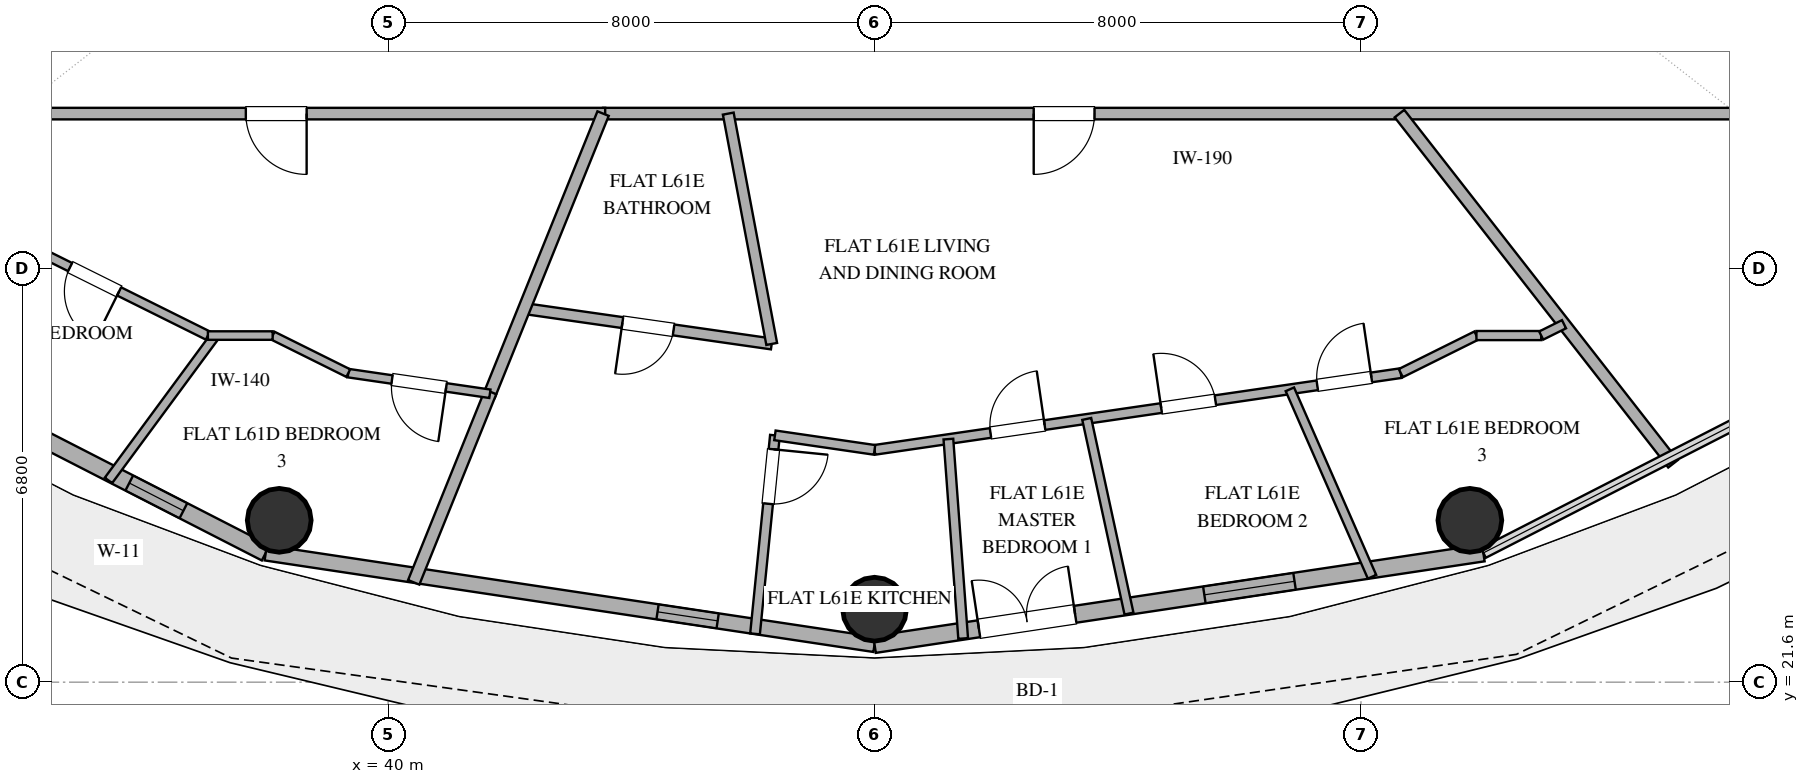
"""IFC4 building model, lengths in metres.
Left out: names, types, materials, properties, quantities, classifications, styles, units other than length and angle.
Written with IfcOpenShell. Run it as: python <this file> out.ifc"""

import sys

from ifc_helpers import new_model, si_unit, direction, frame, frame_2d, origin, origin_2d, place, context, subcontext, project, spatial, rectangle, hollow_circle, extrude, element, fill, save


model = new_model("IFC4")
c1 = context("Model", 3, precision=1e-05, world=origin(), true_north=direction((0.0, 1.0)))
c2 = subcontext(c1, "Body", "Model", "MODEL_VIEW")
j1 = project(units=[si_unit("LENGTHUNIT", "METRE"), si_unit("PLANEANGLEUNIT", "RADIAN")], contexts=[c1])
p1 = place(None, origin())
s1 = spatial("IfcSite", under=j1, at=p1, CompositionType="ELEMENT")
p2 = place(p1, origin())
s2 = spatial("IfcBuilding", under=s1, at=p2, CompositionType="ELEMENT")
p3 = place(p2, frame((0.0, 0.0, 238.8)))
s3 = spatial("IfcBuildingStorey", under=s2, at=p3, CompositionType="ELEMENT", Elevation=238.8)
for number, where, z_axis, x_axis in (
    (1, (38.209, 24.261, 0.0), (0.0, 0.0, 1.0), (1.0, 0.0, 0.0)),
    (2, (48.0, 22.8, 0.0), (0.0, 0.0, 1.0), (1.0, 0.0, 0.0)),
    (3, (57.791, 24.261, 0.0), (0.0, 0.0, 1.0), (1.0, 0.0, 0.0)),
):
    element("IfcColumn", number, at=place(p3, frame(where, z_axis=z_axis, x_axis=x_axis)), inside=s3, PredefinedType="COLUMN", context=c2, shape_type="SweptSolid", body=[
        extrude(hollow_circle(Radius=0.525, WallThickness=0.028, at=origin_2d()), origin(), (0.0, 0.0, 1.0), 3.36),
    ])
p4 = place(p3, frame((29.617, 28.013, 0.0), z_axis=(0.0, 0.0, 1.0), x_axis=(0.890007394051, -0.455946091699, 0.0)))
e4 = element("IfcWall", 4, at=p4, inside=s3, PredefinedType="SOLIDWALL", context=c2, shape_type="SweptSolid", body=[
    extrude(rectangle(XDim=9.404, YDim=0.28, at=frame_2d((4.702, 0.0))), origin(), (0.0, 0.0, 1.0), 3.36),
])
p5 = place(p4, frame((3.073, 0.0, 0.85)))
e5 = element("IfcOpeningElement", 5, at=p5, cuts=e4, PredefinedType="OPENING", context=c2, shape_type="SweptSolid", body=[
    extrude(rectangle(XDim=2.1, YDim=2.2, at=frame_2d((1.05, 1.1))), frame((0.0, 0.15, 0.0), z_axis=(0.0, -1.0, 0.0), x_axis=(1.0, 0.0, 0.0)), (0.0, 0.0, 1.0), 0.3),
])
p6 = place(p4, frame((6.883, 0.0, 0.85)))
e6 = element("IfcOpeningElement", 6, at=p6, cuts=e4, PredefinedType="OPENING", context=c2, shape_type="SweptSolid", body=[
    extrude(rectangle(XDim=1.0, YDim=1.8, at=frame_2d((0.5, 0.9))), frame((0.0, 0.15, 0.0), z_axis=(0.0, -1.0, 0.0), x_axis=(1.0, 0.0, 0.0)), (0.0, 0.0, 1.0), 0.3),
])
p7 = place(p3, frame((37.987, 23.726, 0.0), z_axis=(0.0, 0.0, 1.0), x_axis=(0.988882522213, -0.148698881169, 0.0)))
e7 = element("IfcWall", 7, at=p7, inside=s3, PredefinedType="SOLIDWALL", context=c2, shape_type="SweptSolid", body=[
    extrude(rectangle(XDim=10.125, YDim=0.25, at=frame_2d((5.062, 0.0))), origin(), (0.0, 0.0, 1.0), 3.36),
])
p8 = place(p7, frame((6.516, 0.0, 1.42)))
e8 = element("IfcOpeningElement", 8, at=p8, cuts=e7, PredefinedType="OPENING", context=c2, shape_type="SweptSolid", body=[
    extrude(rectangle(XDim=1.0, YDim=1.05, at=frame_2d((0.5, 0.525))), frame((0.0, 0.135, 0.0), z_axis=(0.0, -1.0, 0.0), x_axis=(1.0, 0.0, 0.0)), (0.0, 0.0, 1.0), 0.27),
])
p9 = place(p3, frame((48.0, 22.22, 0.0), z_axis=(0.0, 0.0, 1.0), x_axis=(0.988882522213, 0.148698881169, 0.0)))
e9 = element("IfcWall", 9, at=p9, inside=s3, PredefinedType="SOLIDWALL", context=c2, shape_type="SweptSolid", body=[
    extrude(rectangle(XDim=10.125, YDim=0.28, at=frame_2d((5.062, 0.0))), origin(), (0.0, 0.0, 1.0), 3.36),
])
p10 = place(p9, frame((1.736, 0.0, 0.0)))
e10 = element("IfcOpeningElement", 10, at=p10, cuts=e9, PredefinedType="OPENING", context=c2, shape_type="SweptSolid", body=[
    extrude(rectangle(XDim=1.6, YDim=2.25, at=frame_2d((0.8, 1.125))), frame((0.0, 0.15, 0.0), z_axis=(0.0, -1.0, 0.0), x_axis=(1.0, 0.0, 0.0)), (0.0, 0.0, 1.0), 0.3),
])
p11 = place(p9, frame((5.485, 0.0, 0.85)))
e11 = element("IfcOpeningElement", 11, at=p11, cuts=e9, PredefinedType="OPENING", context=c2, shape_type="SweptSolid", body=[
    extrude(rectangle(XDim=1.5, YDim=2.0, at=frame_2d((0.75, 1.0))), frame((0.0, 0.15, 0.0), z_axis=(0.0, -1.0, 0.0), x_axis=(1.0, 0.0, 0.0)), (0.0, 0.0, 1.0), 0.3),
])
p12 = place(p3, frame((63.25, 30.95, 0.0), z_axis=(0.0, 0.0, 1.0), x_axis=(-1.0, 0.0, 0.0)))
e12 = element("IfcWall", 12, at=p12, inside=s3, PredefinedType="PARTITIONING", context=c2, shape_type="SweptSolid", body=[
    extrude(rectangle(XDim=19.715, YDim=0.19, at=frame_2d((9.857, 0.0))), origin(), (0.0, 0.0, 1.0), 2.72),
])
p13 = place(p12, frame((11.632, 0.0, 0.0)))
e13 = element("IfcOpeningElement", 13, at=p13, cuts=e12, PredefinedType="OPENING", context=c2, shape_type="SweptSolid", body=[
    extrude(rectangle(XDim=1.0, YDim=2.2, at=frame_2d((0.5, 1.1))), frame((0.0, 0.105, 0.0), z_axis=(0.0, -1.0, 0.0), x_axis=(1.0, 0.0, 0.0)), (0.0, 0.0, 1.0), 0.21),
])
p14 = place(p3, frame((43.57, 30.95, 0.0), z_axis=(0.0, 0.0, 1.0), x_axis=(-1.0, 0.0, 0.0)))
e14 = element("IfcWall", 14, at=p14, inside=s3, PredefinedType="PARTITIONING", context=c2, shape_type="SweptSolid", body=[
    extrude(rectangle(XDim=10.82, YDim=0.19, at=frame_2d((5.41, 0.0))), origin(), (0.0, 0.0, 1.0), 2.72),
])
p15 = place(p14, frame((4.91, 0.0, 0.0)))
e15 = element("IfcOpeningElement", 15, at=p15, cuts=e14, PredefinedType="OPENING", context=c2, shape_type="SweptSolid", body=[
    extrude(rectangle(XDim=1.0, YDim=2.2, at=frame_2d((0.5, 1.1))), frame((0.0, 0.105, 0.0), z_axis=(0.0, -1.0, 0.0), x_axis=(1.0, 0.0, 0.0)), (0.0, 0.0, 1.0), 0.21),
])
p16 = place(p3, frame((56.633, 30.95, 0.0), z_axis=(0.0, 0.0, 1.0), x_axis=(0.615657656631, -0.788013737083, 0.0)))
e16 = element("IfcWall", 16, at=p16, inside=s3, PredefinedType="PARTITIONING", context=c2, shape_type="SweptSolid", body=[
    extrude(rectangle(XDim=7.308, YDim=0.2, at=frame_2d((3.654, 0.0))), origin(), (0.0, 0.0, 1.0), 2.72),
])
p17 = place(p3, frame((37.036, 27.3, 0.0), z_axis=(0.0, 0.0, 1.0), x_axis=(-0.895471406875, 0.445119039661, 0.0)))
e17 = element("IfcWall", 17, at=p17, inside=s3, PredefinedType="PARTITIONING", context=c2, shape_type="SweptSolid", body=[
    extrude(rectangle(XDim=5.971, YDim=0.15, at=frame_2d((2.986, 0.0))), origin(), (0.0, 0.0, 1.0), 2.72),
])
p18 = place(p17, frame((1.631, 0.0, 0.0)))
e18 = element("IfcOpeningElement", 18, at=p18, cuts=e17, PredefinedType="OPENING", context=c2, shape_type="SweptSolid", body=[
    extrude(rectangle(XDim=0.9, YDim=2.1, at=frame_2d((0.45, 1.05))), frame((0.0, 0.085, 0.0), z_axis=(0.0, -1.0, 0.0), x_axis=(1.0, 0.0, 0.0)), (0.0, 0.0, 1.0), 0.17),
])
p19 = place(p17, frame((4.582, 0.0, 0.0)))
e19 = element("IfcOpeningElement", 19, at=p19, cuts=e17, PredefinedType="OPENING", context=c2, shape_type="SweptSolid", body=[
    extrude(rectangle(XDim=0.9, YDim=2.1, at=frame_2d((0.45, 1.05))), frame((0.0, 0.085, 0.0), z_axis=(0.0, -1.0, 0.0), x_axis=(1.0, 0.0, 0.0)), (0.0, 0.0, 1.0), 0.17),
])
p20 = place(p3, frame((46.309, 27.162, 0.0), z_axis=(0.0, 0.0, 1.0), x_axis=(-0.989929285776, 0.141562739319, 0.0)))
e20 = element("IfcWall", 20, at=p20, inside=s3, PredefinedType="PLUMBINGWALL", context=c2, shape_type="SweptSolid", body=[
    extrude(rectangle(XDim=4.11, YDim=0.18, at=frame_2d((2.055, 0.0))), origin(), (0.0, 0.0, 1.0), 2.72),
])
p21 = place(p20, frame((1.63, 0.0, 0.0)))
e21 = element("IfcOpeningElement", 21, at=p21, cuts=e20, PredefinedType="OPENING", context=c2, shape_type="SweptSolid", body=[
    extrude(rectangle(XDim=0.85, YDim=2.1, at=frame_2d((0.425, 1.05))), frame((0.0, 0.1, 0.0), z_axis=(0.0, -1.0, 0.0), x_axis=(1.0, 0.0, 0.0)), (0.0, 0.0, 1.0), 0.2),
])
p22 = place(p3, frame((45.594, 30.95, 0.0), z_axis=(0.0, 0.0, 1.0), x_axis=(0.18532477331, -0.982677326694, 0.0)))
e22 = element("IfcWall", 22, at=p22, inside=s3, PredefinedType="PLUMBINGWALL", context=c2, shape_type="SweptSolid", body=[
    extrude(rectangle(XDim=3.854, YDim=0.18, at=frame_2d((1.927, 0.0))), origin(), (0.0, 0.0, 1.0), 2.72),
])
p23 = place(p3, frame((43.535, 30.95, 0.0), z_axis=(0.0, 0.0, 1.0), x_axis=(-0.374594584492, -0.927188706397, 0.0)))
e23 = element("IfcWall", 23, at=p23, inside=s3, PredefinedType="PARTITIONING", context=c2, shape_type="SweptSolid", body=[
    extrude(rectangle(XDim=5.002, YDim=0.2, at=frame_2d((2.501, 0.0))), origin(), (0.0, 0.0, 1.0), 2.72),
])
p24 = place(p3, frame((40.421, 23.242, 0.0), z_axis=(0.0, 0.0, 1.0), x_axis=(0.374604084458, 0.927184868248, 0.0)))
e24 = element("IfcWall", 24, at=p24, inside=s3, PredefinedType="PARTITIONING", context=c2, shape_type="SweptSolid", body=[
    extrude(rectangle(XDim=3.377, YDim=0.2, at=frame_2d((1.688, 0.0))), origin(), (0.0, 0.0, 1.0), 2.72),
])
p25 = place(p3, frame((48.0, 25.42, 0.0), z_axis=(0.0, 0.0, 1.0), x_axis=(0.989540121389, 0.144257922351, 0.0)))
e25 = element("IfcWall", 25, at=p25, inside=s3, PredefinedType="PLUMBINGWALL", context=c2, shape_type="SweptSolid", body=[
    extrude(rectangle(XDim=8.746, YDim=0.16, at=frame_2d((4.373, 0.0))), origin(), (0.0, 0.0, 1.0), 2.72),
])
p26 = place(p25, frame((4.765, 0.0, 0.0)))
e26 = element("IfcOpeningElement", 26, at=p26, cuts=e25, PredefinedType="OPENING", context=c2, shape_type="SweptSolid", body=[
    extrude(rectangle(XDim=0.9, YDim=2.1, at=frame_2d((0.45, 1.05))), frame((0.0, 0.09, 0.0), z_axis=(0.0, -1.0, 0.0), x_axis=(1.0, 0.0, 0.0)), (0.0, 0.0, 1.0), 0.18),
])
p27 = place(p25, frame((1.927, 0.0, 0.0)))
e27 = element("IfcOpeningElement", 27, at=p27, cuts=e25, PredefinedType="OPENING", context=c2, shape_type="SweptSolid", body=[
    extrude(rectangle(XDim=0.9, YDim=2.1, at=frame_2d((0.45, 1.05))), frame((0.0, 0.09, 0.0), z_axis=(0.0, -1.0, 0.0), x_axis=(1.0, 0.0, 0.0)), (0.0, 0.0, 1.0), 0.18),
])
p28 = place(p25, frame((7.358, 0.0, 0.0)))
e28 = element("IfcOpeningElement", 28, at=p28, cuts=e25, PredefinedType="OPENING", context=c2, shape_type="SweptSolid", body=[
    extrude(rectangle(XDim=0.9, YDim=2.1, at=frame_2d((0.45, 1.05))), frame((0.0, 0.09, 0.0), z_axis=(0.0, -1.0, 0.0), x_axis=(1.0, 0.0, 0.0)), (0.0, 0.0, 1.0), 0.18),
])
p29 = place(p3, frame((54.831, 26.416, 0.0), z_axis=(0.0, 0.0, 1.0), x_axis=(0.401469388376, -0.915872442099, 0.0)))
e29 = element("IfcWall", 29, at=p29, inside=s3, PredefinedType="PARTITIONING", context=c2, shape_type="SweptSolid", body=[
    extrude(rectangle(XDim=3.366, YDim=0.15, at=frame_2d((1.683, 0.0))), origin(), (0.0, 0.0, 1.0), 2.72),
])
p30 = place(p3, frame((49.458, 22.318, 0.0), z_axis=(0.0, 0.0, 1.0), x_axis=(-0.073879890619, 0.997267146637, 0.0)))
e30 = element("IfcWall", 30, at=p30, inside=s3, PredefinedType="PLUMBINGWALL", context=c2, shape_type="SweptSolid", body=[
    extrude(rectangle(XDim=3.288, YDim=0.16, at=frame_2d((1.644, 0.0))), origin(), (0.0, 0.0, 1.0), 2.72),
])
p31 = place(p3, frame((46.362, 25.659, 0.0), z_axis=(0.0, 0.0, 1.0), x_axis=(-0.099783673114, -0.995009155023, 0.0)))
e31 = element("IfcWall", 31, at=p31, inside=s3, PredefinedType="PLUMBINGWALL", context=c2, shape_type="SweptSolid", body=[
    extrude(rectangle(XDim=3.281, YDim=0.16, at=frame_2d((1.641, 0.0))), origin(), (0.0, 0.0, 1.0), 2.72),
])
p32 = place(p31, frame((0.23, 0.0, 0.0)))
e32 = element("IfcOpeningElement", 32, at=p32, cuts=e31, PredefinedType="OPENING", context=c2, shape_type="SweptSolid", body=[
    extrude(rectangle(XDim=0.9, YDim=2.1, at=frame_2d((0.45, 1.05))), frame((0.0, 0.09, 0.0), z_axis=(0.0, -1.0, 0.0), x_axis=(1.0, 0.0, 0.0)), (0.0, 0.0, 1.0), 0.18),
])
p33 = place(p3, frame((52.185, 22.728, 0.0), z_axis=(0.0, 0.0, 1.0), x_axis=(-0.212200652442, 0.977226116671, 0.0)))
e33 = element("IfcWall", 33, at=p33, inside=s3, PredefinedType="PARTITIONING", context=c2, shape_type="SweptSolid", body=[
    extrude(rectangle(XDim=3.276, YDim=0.15, at=frame_2d((1.638, 0.0))), origin(), (0.0, 0.0, 1.0), 2.72),
])
p34 = place(p3, frame((35.401, 24.918, 0.0), z_axis=(0.0, 0.0, 1.0), x_axis=(0.593567519028, 0.804784194897, 0.0)))
e34 = element("IfcWall", 34, at=p34, inside=s3, PredefinedType="PARTITIONING", context=c2, shape_type="SweptSolid", body=[
    extrude(rectangle(XDim=2.96, YDim=0.15, at=frame_2d((1.48, 0.0))), origin(), (0.0, 0.0, 1.0), 2.72),
])
p35 = place(p3, frame((41.674, 26.343, 0.0), z_axis=(0.0, 0.0, 1.0), x_axis=(-0.989532363779, 0.144311125814, 0.0)))
e35 = element("IfcWall", 35, at=p35, inside=s3, PredefinedType="PARTITIONING", context=c2, shape_type="SweptSolid", body=[
    extrude(rectangle(XDim=2.353, YDim=0.14, at=frame_2d((1.177, 0.0))), origin(), (0.0, 0.0, 1.0), 2.72),
])
p36 = place(p35, frame((0.727, 0.0, 0.0)))
e36 = element("IfcOpeningElement", 36, at=p36, cuts=e35, PredefinedType="OPENING", context=c2, shape_type="SweptSolid", body=[
    extrude(rectangle(XDim=0.9, YDim=2.1, at=frame_2d((0.45, 1.05))), frame((0.0, 0.08, 0.0), z_axis=(0.0, -1.0, 0.0), x_axis=(1.0, 0.0, 0.0)), (0.0, 0.0, 1.0), 0.16),
])
p37 = place(p3, frame((48.0, 25.42, 0.0), z_axis=(0.0, 0.0, 1.0), x_axis=(-0.989523327183, 0.144373075605, 0.0)))
e37 = element("IfcWall", 37, at=p37, inside=s3, PredefinedType="PLUMBINGWALL", context=c2, shape_type="SweptSolid", body=[
    extrude(rectangle(XDim=1.656, YDim=0.16, at=frame_2d((0.828, 0.0))), origin(), (0.0, 0.0, 1.0), 2.72),
])
p38 = place(p3, frame((39.345, 26.682, 0.0), z_axis=(0.0, 0.0, 1.0), x_axis=(-0.895584310315, 0.444891833053, 0.0)))
e38 = element("IfcWall", 38, at=p38, inside=s3, PredefinedType="PARTITIONING", context=c2, shape_type="SweptSolid", body=[
    extrude(rectangle(XDim=1.389, YDim=0.14, at=frame_2d((0.694, 0.0))), origin(), (0.0, 0.0, 1.0), 2.72),
])
p39 = place(p3, frame((57.899, 27.3, 0.0), z_axis=(0.0, 0.0, 1.0), x_axis=(-0.895584310315, -0.444891833053, 0.0)))
e39 = element("IfcWall", 39, at=p39, inside=s3, PredefinedType="PARTITIONING", context=c2, shape_type="SweptSolid", body=[
    extrude(rectangle(XDim=1.389, YDim=0.15, at=frame_2d((0.694, 0.0))), origin(), (0.0, 0.0, 1.0), 2.72),
])
p40 = place(p3, frame((58.964, 27.3, 0.0), z_axis=(0.0, 0.0, 1.0), x_axis=(-1.0, 0.0, 0.0)))
e40 = element("IfcWall", 40, at=p40, inside=s3, PredefinedType="PARTITIONING", context=c2, shape_type="SweptSolid", body=[
    extrude(rectangle(XDim=1.065, YDim=0.15, at=frame_2d((0.533, 0.0))), origin(), (0.0, 0.0, 1.0), 2.72),
])
p41 = place(p3, frame((38.101, 27.3, 0.0), z_axis=(0.0, 0.0, 1.0), x_axis=(-1.0, 0.0, 0.0)))
e41 = element("IfcWall", 41, at=p41, inside=s3, PredefinedType="PARTITIONING", context=c2, shape_type="SweptSolid", body=[
    extrude(rectangle(XDim=1.065, YDim=0.14, at=frame_2d((0.533, 0.0))), origin(), (0.0, 0.0, 1.0), 2.72),
])
p42 = place(p3, frame((59.339, 27.487, 0.0), z_axis=(0.0, 0.0, 1.0), x_axis=(-0.895473432012, -0.445114965554, 0.0)))
e42 = element("IfcWall", 42, at=p42, inside=s3, PredefinedType="PARTITIONING", context=c2, shape_type="SweptSolid", body=[
    extrude(rectangle(XDim=0.419, YDim=0.15, at=frame_2d((0.209, 0.0))), origin(), (0.0, 0.0, 1.0), 2.72),
])
p43 = place(p6, origin())
e43 = element("IfcWindow", 43, at=p43, inside=s3, PartitioningType="SINGLE_PANEL", PredefinedType="WINDOW", context=c2, shape_type="SweptSolid", body=[
    extrude(rectangle(XDim=1.0, YDim=1.8, at=frame_2d((0.5, 0.9))), frame((0.0, 0.03, 0.0), z_axis=(0.0, -1.0, 0.0), x_axis=(1.0, 0.0, 0.0)), (0.0, 0.0, 1.0), 0.06),
])
fill(e6, e43)
p44 = place(p10, origin())
e44 = element("IfcDoor", 44, at=p44, inside=s3, OperationType="DOUBLE_DOOR_SINGLE_SWING", PredefinedType="DOOR", context=c2, shape_type="SweptSolid", body=[
    extrude(rectangle(XDim=1.6, YDim=2.25, at=frame_2d((0.8, 1.125))), frame((0.0, 0.025, 0.0), z_axis=(0.0, -1.0, 0.0), x_axis=(1.0, 0.0, 0.0)), (0.0, 0.0, 1.0), 0.05),
])
fill(e10, e44)
p45 = place(p11, origin())
e45 = element("IfcWindow", 45, at=p45, inside=s3, PartitioningType="SINGLE_PANEL", PredefinedType="WINDOW", context=c2, shape_type="SweptSolid", body=[
    extrude(rectangle(XDim=1.5, YDim=2.0, at=frame_2d((0.75, 1.0))), frame((0.0, 0.03, 0.0), z_axis=(0.0, -1.0, 0.0), x_axis=(1.0, 0.0, 0.0)), (0.0, 0.0, 1.0), 0.06),
])
fill(e11, e45)
p46 = place(p8, origin())
e46 = element("IfcWindow", 46, at=p46, inside=s3, PartitioningType="SINGLE_PANEL", PredefinedType="WINDOW", context=c2, shape_type="SweptSolid", body=[
    extrude(rectangle(XDim=1.0, YDim=1.05, at=frame_2d((0.5, 0.525))), frame((0.0, 0.03, 0.0), z_axis=(0.0, -1.0, 0.0), x_axis=(1.0, 0.0, 0.0)), (0.0, 0.0, 1.0), 0.06),
])
fill(e8, e46)
p47 = place(p13, origin())
e47 = element("IfcDoor", 47, at=p47, inside=s3, OperationType="SINGLE_SWING_RIGHT", PredefinedType="DOOR", context=c2, shape_type="SweptSolid", body=[
    extrude(rectangle(XDim=1.0, YDim=2.2, at=frame_2d((0.5, 1.1))), frame((0.0, 0.025, 0.0), z_axis=(0.0, -1.0, 0.0), x_axis=(1.0, 0.0, 0.0)), (0.0, 0.0, 1.0), 0.05),
])
fill(e13, e47)
p48 = place(p15, origin())
e48 = element("IfcDoor", 48, at=p48, inside=s3, OperationType="SINGLE_SWING_LEFT", PredefinedType="DOOR", context=c2, shape_type="SweptSolid", body=[
    extrude(rectangle(XDim=1.0, YDim=2.2, at=frame_2d((0.5, 1.1))), frame((0.0, 0.025, 0.0), z_axis=(0.0, -1.0, 0.0), x_axis=(1.0, 0.0, 0.0)), (0.0, 0.0, 1.0), 0.05),
])
fill(e15, e48)
p49 = place(p18, origin())
e49 = element("IfcDoor", 49, at=p49, inside=s3, OperationType="SINGLE_SWING_LEFT", PredefinedType="DOOR", context=c2, shape_type="SweptSolid", body=[
    extrude(rectangle(XDim=0.9, YDim=2.1, at=frame_2d((0.45, 1.05))), frame((0.0, 0.025, 0.0), z_axis=(0.0, -1.0, 0.0), x_axis=(1.0, 0.0, 0.0)), (0.0, 0.0, 1.0), 0.05),
])
fill(e18, e49)
p50 = place(p21, origin())
e50 = element("IfcDoor", 50, at=p50, inside=s3, OperationType="SINGLE_SWING_RIGHT", PredefinedType="DOOR", context=c2, shape_type="SweptSolid", body=[
    extrude(rectangle(XDim=0.85, YDim=2.1, at=frame_2d((0.425, 1.05))), frame((0.0, 0.025, 0.0), z_axis=(0.0, -1.0, 0.0), x_axis=(1.0, 0.0, 0.0)), (0.0, 0.0, 1.0), 0.05),
])
fill(e21, e50)
p51 = place(p26, origin())
e51 = element("IfcDoor", 51, at=p51, inside=s3, OperationType="SINGLE_SWING_LEFT", PredefinedType="DOOR", context=c2, shape_type="SweptSolid", body=[
    extrude(rectangle(XDim=0.9, YDim=2.1, at=frame_2d((0.45, 1.05))), frame((0.0, 0.025, 0.0), z_axis=(0.0, -1.0, 0.0), x_axis=(1.0, 0.0, 0.0)), (0.0, 0.0, 1.0), 0.05),
])
fill(e26, e51)
p52 = place(p27, origin())
e52 = element("IfcDoor", 52, at=p52, inside=s3, OperationType="SINGLE_SWING_RIGHT", PredefinedType="DOOR", context=c2, shape_type="SweptSolid", body=[
    extrude(rectangle(XDim=0.9, YDim=2.1, at=frame_2d((0.45, 1.05))), frame((0.0, 0.025, 0.0), z_axis=(0.0, -1.0, 0.0), x_axis=(1.0, 0.0, 0.0)), (0.0, 0.0, 1.0), 0.05),
])
fill(e27, e52)
p53 = place(p28, origin())
e53 = element("IfcDoor", 53, at=p53, inside=s3, OperationType="SINGLE_SWING_RIGHT", PredefinedType="DOOR", context=c2, shape_type="SweptSolid", body=[
    extrude(rectangle(XDim=0.9, YDim=2.1, at=frame_2d((0.45, 1.05))), frame((0.0, 0.025, 0.0), z_axis=(0.0, -1.0, 0.0), x_axis=(1.0, 0.0, 0.0)), (0.0, 0.0, 1.0), 0.05),
])
fill(e28, e53)
p54 = place(p32, origin())
e54 = element("IfcDoor", 54, at=p54, inside=s3, OperationType="SINGLE_SWING_LEFT", PredefinedType="DOOR", context=c2, shape_type="SweptSolid", body=[
    extrude(rectangle(XDim=0.9, YDim=2.1, at=frame_2d((0.45, 1.05))), frame((0.0, 0.025, 0.0), z_axis=(0.0, -1.0, 0.0), x_axis=(1.0, 0.0, 0.0)), (0.0, 0.0, 1.0), 0.05),
])
fill(e32, e54)
p55 = place(p36, origin())
e55 = element("IfcDoor", 55, at=p55, inside=s3, OperationType="SINGLE_SWING_LEFT", PredefinedType="DOOR", context=c2, shape_type="SweptSolid", body=[
    extrude(rectangle(XDim=0.9, YDim=2.1, at=frame_2d((0.45, 1.05))), frame((0.0, 0.025, 0.0), z_axis=(0.0, -1.0, 0.0), x_axis=(1.0, 0.0, 0.0)), (0.0, 0.0, 1.0), 0.05),
])
fill(e36, e55)
save(model, sys.argv[1])
